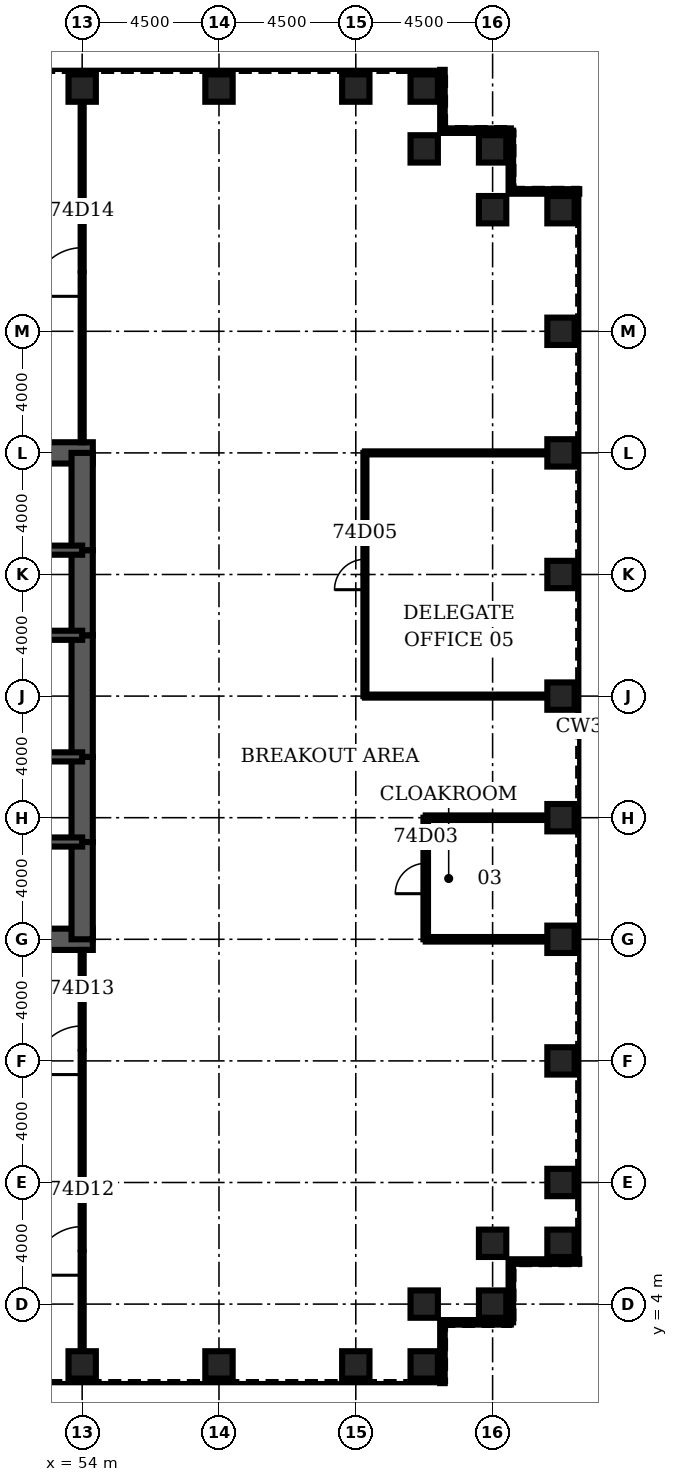
"""IFC4 building model, lengths in metres.
Left out: names, types, materials, properties, quantities, classifications, styles, units other than length and angle.
Written with IfcOpenShell. Run it as: python <this file> out.ifc"""

import sys

from ifc_helpers import new_model, si_unit, direction, frame, frame_2d, origin, origin_2d, place, context, subcontext, project, spatial, rectangle, hollow_rectangle, extrude, element, fill, save


model = new_model("IFC4")
c1 = context("Model", 3, precision=1e-05, world=origin(), true_north=direction((0.0, 1.0)))
c2 = subcontext(c1, "Body", "Model", "MODEL_VIEW")
j1 = project(units=[si_unit("LENGTHUNIT", "METRE"), si_unit("PLANEANGLEUNIT", "RADIAN")], contexts=[c1])
p1 = place(None, origin())
s1 = spatial("IfcSite", under=j1, at=p1, CompositionType="ELEMENT")
p2 = place(p1, origin())
s2 = spatial("IfcBuilding", under=s1, at=p2, CompositionType="ELEMENT")
p3 = place(p2, frame((0.0, 0.0, 325.7)))
s3 = spatial("IfcBuildingStorey", under=s2, at=p3, CompositionType="ELEMENT", Elevation=325.7)
for number, where, z_axis, x_axis in (
    (1, (54.0, 2.0, 0.0), (0.0, 0.0, 1.0), (0.0, 1.0, 0.0)),
    (2, (58.5, 2.0, 0.0), (0.0, 0.0, 1.0), (0.0, 1.0, 0.0)),
    (3, (63.0, 2.0, 0.0), (0.0, 0.0, 1.0), (0.0, 1.0, 0.0)),
    (4, (65.25, 2.0, 0.0), (0.0, 0.0, 1.0), (0.0, 1.0, 0.0)),
    (5, (65.25, 4.0, 0.0), (0.0, 0.0, 1.0), (0.0, 1.0, 0.0)),
    (6, (67.5, 4.0, 0.0), (0.0, 0.0, 1.0), (1.0, 0.0, 0.0)),
    (7, (67.5, 6.0, 0.0), (0.0, 0.0, 1.0), (1.0, 0.0, 0.0)),
    (8, (69.75, 6.0, 0.0), (0.0, 0.0, 1.0), (1.0, 0.0, 0.0)),
    (9, (69.75, 8.0, 0.0), (0.0, 0.0, 1.0), (1.0, 0.0, 0.0)),
    (10, (69.75, 12.0, 0.0), (0.0, 0.0, 1.0), (1.0, 0.0, 0.0)),
    (11, (69.75, 16.0, 0.0), (0.0, 0.0, 1.0), (1.0, 0.0, 0.0)),
    (12, (69.75, 20.0, 0.0), (0.0, 0.0, 1.0), (1.0, 0.0, 0.0)),
    (13, (69.75, 24.0, 0.0), (0.0, 0.0, 1.0), (1.0, 0.0, 0.0)),
    (14, (69.75, 28.0, 0.0), (0.0, 0.0, 1.0), (1.0, 0.0, 0.0)),
    (15, (69.75, 32.0, 0.0), (0.0, 0.0, 1.0), (1.0, 0.0, 0.0)),
    (16, (69.75, 36.0, 0.0), (0.0, 0.0, 1.0), (1.0, 0.0, 0.0)),
    (17, (69.75, 40.0, 0.0), (0.0, 0.0, 1.0), (1.0, 0.0, 0.0)),
    (18, (67.5, 40.0, 0.0), (0.0, 0.0, 1.0), (1.0, 0.0, 0.0)),
    (19, (67.5, 42.0, 0.0), (0.0, 0.0, 1.0), (1.0, 0.0, 0.0)),
    (20, (65.25, 42.0, 0.0), (0.0, 0.0, 1.0), (0.0, 1.0, 0.0)),
    (21, (65.25, 44.0, 0.0), (0.0, 0.0, 1.0), (0.0, 1.0, 0.0)),
    (22, (63.0, 44.0, 0.0), (0.0, 0.0, 1.0), (0.0, 1.0, 0.0)),
    (23, (58.5, 44.0, 0.0), (0.0, 0.0, 1.0), (0.0, 1.0, 0.0)),
    (24, (54.0, 44.0, 0.0), (0.0, 0.0, 1.0), (0.0, 1.0, 0.0)),
):
    element("IfcColumn", number, at=place(p3, frame(where, z_axis=z_axis, x_axis=x_axis)), inside=s3, PredefinedType="COLUMN", context=c2, shape_type="SweptSolid", body=[
        extrude(hollow_rectangle(XDim=0.9, YDim=0.9, WallThickness=0.05, at=origin_2d()), origin(), (0.0, 0.0, 1.0), 4.2),
    ])
for number, where, z_axis, x_axis in (
    (25, (45.0, 16.0, 0.0), (0.0, 0.0, 1.0), (1.0, 0.0, 0.0)),
    (26, (54.35, 32.0, 0.0), (0.0, 0.0, 1.0), (-1.0, 0.0, 0.0)),
):
    element("IfcWall", number, at=place(p3, frame(where, z_axis=z_axis, x_axis=x_axis)), inside=s3, PredefinedType="SHEAR", context=c2, shape_type="SweptSolid", body=[
        extrude(rectangle(XDim=9.35, YDim=0.7, at=frame_2d((4.675, 0.0))), origin(), (0.0, 0.0, 1.0), 4.2),
    ])
p4 = place(p3, frame((54.0, 16.0, 0.0), z_axis=(0.0, 0.0, 1.0), x_axis=(0.0, 1.0, 0.0)))
e27 = element("IfcWall", 27, at=p4, inside=s3, PredefinedType="SHEAR", context=c2, shape_type="SweptSolid", body=[
    extrude(rectangle(XDim=3.2, YDim=0.7, at=frame_2d((1.6, 0.0))), origin(), (0.0, 0.0, 1.0), 4.2),
])
p5 = place(p3, frame((54.0, 19.2, 0.0), z_axis=(0.0, 0.0, 1.0), x_axis=(0.0, 1.0, 0.0)))
e28 = element("IfcWall", 28, at=p5, inside=s3, PredefinedType="SHEAR", context=c2, shape_type="SweptSolid", body=[
    extrude(rectangle(XDim=2.8, YDim=0.7, at=frame_2d((1.4, 0.0))), origin(), (0.0, 0.0, 1.0), 4.2),
])
p6 = place(p5, frame((0.4, 0.0, 0.0)))
e29 = element("IfcOpeningElement", 29, at=p6, cuts=e28, PredefinedType="OPENING", context=c2, shape_type="SweptSolid", body=[
    extrude(rectangle(XDim=1.8, YDim=2.1, at=frame_2d((0.9, 1.05))), frame((0.0, 0.36, 0.0), z_axis=(0.0, -1.0, 0.0), x_axis=(1.0, 0.0, 0.0)), (0.0, 0.0, 1.0), 0.72),
])
p7 = place(p3, frame((54.0, 22.0, 0.0), z_axis=(0.0, 0.0, 1.0), x_axis=(0.0, 1.0, 0.0)))
e30 = element("IfcWall", 30, at=p7, inside=s3, PredefinedType="SHEAR", context=c2, shape_type="SweptSolid", body=[
    extrude(rectangle(XDim=4.0, YDim=0.7, at=frame_2d((2.0, 0.0))), origin(), (0.0, 0.0, 1.0), 4.2),
])
p8 = place(p3, frame((54.0, 26.0, 0.0), z_axis=(0.0, 0.0, 1.0), x_axis=(0.0, 1.0, 0.0)))
e31 = element("IfcWall", 31, at=p8, inside=s3, PredefinedType="SHEAR", context=c2, shape_type="SweptSolid", body=[
    extrude(rectangle(XDim=2.8, YDim=0.7, at=frame_2d((1.4, 0.0))), origin(), (0.0, 0.0, 1.0), 4.2),
])
p9 = place(p8, frame((0.6, 0.0, 0.0)))
e32 = element("IfcOpeningElement", 32, at=p9, cuts=e31, PredefinedType="OPENING", context=c2, shape_type="SweptSolid", body=[
    extrude(rectangle(XDim=1.8, YDim=2.1, at=frame_2d((0.9, 1.05))), frame((0.0, 0.36, 0.0), z_axis=(0.0, -1.0, 0.0), x_axis=(1.0, 0.0, 0.0)), (0.0, 0.0, 1.0), 0.72),
])
p10 = place(p3, frame((54.0, 28.8, 0.0), z_axis=(0.0, 0.0, 1.0), x_axis=(0.0, 1.0, 0.0)))
e33 = element("IfcWall", 33, at=p10, inside=s3, PredefinedType="SHEAR", context=c2, shape_type="SweptSolid", body=[
    extrude(rectangle(XDim=3.2, YDim=0.7, at=frame_2d((1.6, 0.0))), origin(), (0.0, 0.0, 1.0), 4.2),
])
p11 = place(p3, frame((45.0, 19.2, 0.0), z_axis=(0.0, 0.0, 1.0), x_axis=(1.0, 0.0, 0.0)))
e34 = element("IfcWall", 34, at=p11, inside=s3, PredefinedType="SOLIDWALL", context=c2, shape_type="SweptSolid", body=[
    extrude(rectangle(XDim=9.0, YDim=0.3, at=frame_2d((4.5, 0.0))), origin(), (0.0, 0.0, 1.0), 4.2),
])
p12 = place(p11, frame((7.35, 0.0, 0.0)))
e35 = element("IfcOpeningElement", 35, at=p12, cuts=e34, PredefinedType="OPENING", context=c2, shape_type="SweptSolid", body=[
    extrude(rectangle(XDim=1.0, YDim=2.1, at=frame_2d((0.5, 1.05))), frame((0.0, 0.16, 0.0), z_axis=(0.0, -1.0, 0.0), x_axis=(1.0, 0.0, 0.0)), (0.0, 0.0, 1.0), 0.32),
])
p13 = place(p3, frame((45.0, 28.8, 0.0), z_axis=(0.0, 0.0, 1.0), x_axis=(1.0, 0.0, 0.0)))
e36 = element("IfcWall", 36, at=p13, inside=s3, PredefinedType="SOLIDWALL", context=c2, shape_type="SweptSolid", body=[
    extrude(rectangle(XDim=9.0, YDim=0.3, at=frame_2d((4.5, 0.0))), origin(), (0.0, 0.0, 1.0), 4.2),
])
p14 = place(p13, frame((7.35, 0.0, 0.0)))
e37 = element("IfcOpeningElement", 37, at=p14, cuts=e36, PredefinedType="OPENING", context=c2, shape_type="SweptSolid", body=[
    extrude(rectangle(XDim=1.0, YDim=2.1, at=frame_2d((0.5, 1.05))), frame((0.0, 0.16, 0.0), z_axis=(0.0, -1.0, 0.0), x_axis=(1.0, 0.0, 0.0)), (0.0, 0.0, 1.0), 0.32),
])
p15 = place(p3, frame((48.0, 22.0, 0.0), z_axis=(0.0, 0.0, 1.0), x_axis=(1.0, 0.0, 0.0)))
e38 = element("IfcWall", 38, at=p15, inside=s3, PredefinedType="SOLIDWALL", context=c2, shape_type="SweptSolid", body=[
    extrude(rectangle(XDim=6.0, YDim=0.3, at=frame_2d((3.0, 0.0))), origin(), (0.0, 0.0, 1.0), 4.2),
])
p16 = place(p15, frame((2.0, 0.0, 0.0)))
e39 = element("IfcOpeningElement", 39, at=p16, cuts=e38, PredefinedType="OPENING", context=c2, shape_type="SweptSolid", body=[
    extrude(rectangle(XDim=1.0, YDim=2.1, at=frame_2d((0.5, 1.05))), frame((0.0, 0.16, 0.0), z_axis=(0.0, -1.0, 0.0), x_axis=(1.0, 0.0, 0.0)), (0.0, 0.0, 1.0), 0.32),
])
p17 = place(p15, frame((4.4, 0.0, 0.0)))
e40 = element("IfcOpeningElement", 40, at=p17, cuts=e38, PredefinedType="OPENING", context=c2, shape_type="SweptSolid", body=[
    extrude(rectangle(XDim=1.0, YDim=2.1, at=frame_2d((0.5, 1.05))), frame((0.0, 0.16, 0.0), z_axis=(0.0, -1.0, 0.0), x_axis=(1.0, 0.0, 0.0)), (0.0, 0.0, 1.0), 0.32),
])
p18 = place(p3, frame((48.0, 26.0, 0.0), z_axis=(0.0, 0.0, 1.0), x_axis=(1.0, 0.0, 0.0)))
e41 = element("IfcWall", 41, at=p18, inside=s3, PredefinedType="SOLIDWALL", context=c2, shape_type="SweptSolid", body=[
    extrude(rectangle(XDim=6.0, YDim=0.3, at=frame_2d((3.0, 0.0))), origin(), (0.0, 0.0, 1.0), 4.2),
])
for number, where, z_axis, x_axis in (
    (42, (65.3, 16.0, 0.0), (0.0, 0.0, 1.0), (1.0, 0.0, 0.0)),
    (43, (65.3, 20.0, 0.0), (0.0, 0.0, 1.0), (1.0, 0.0, 0.0)),
):
    element("IfcWall", number, at=place(p3, frame(where, z_axis=z_axis, x_axis=x_axis)), inside=s3, PredefinedType="PARTITIONING", context=c2, shape_type="SweptSolid", body=[
        extrude(rectangle(XDim=4.0, YDim=0.15, at=frame_2d((2.0, 0.0))), origin(), (0.0, 0.0, 1.0), 3.0),
    ])
for number, where, z_axis, x_axis in (
    (44, (63.3, 24.0, 0.0), (0.0, 0.0, 1.0), (1.0, 0.0, 0.0)),
    (45, (63.3, 32.0, 0.0), (0.0, 0.0, 1.0), (1.0, 0.0, 0.0)),
):
    element("IfcWall", number, at=place(p3, frame(where, z_axis=z_axis, x_axis=x_axis)), inside=s3, PredefinedType="PARTITIONING", context=c2, shape_type="SweptSolid", body=[
        extrude(rectangle(XDim=6.0, YDim=0.1, at=frame_2d((3.0, 0.0))), origin(), (0.0, 0.0, 1.0), 3.0),
    ])
p19 = place(p3, frame((54.0, 2.45, 0.0), z_axis=(0.0, 0.0, 1.0), x_axis=(0.0, 1.0, 0.0)))
e46 = element("IfcWall", 46, at=p19, inside=s3, PredefinedType="PARTITIONING", context=c2, shape_type="SweptSolid", body=[
    extrude(rectangle(XDim=13.2, YDim=0.1, at=frame_2d((6.6, 0.0))), origin(), (0.0, 0.0, 1.0), 3.0),
])
p20 = place(p19, frame((2.5, 0.0, 0.0)))
e47 = element("IfcOpeningElement", 47, at=p20, cuts=e46, PredefinedType="OPENING", context=c2, shape_type="SweptSolid", body=[
    extrude(rectangle(XDim=1.6, YDim=2.1, at=frame_2d((0.8, 1.05))), frame((0.0, 0.06, 0.0), z_axis=(0.0, -1.0, 0.0), x_axis=(1.0, 0.0, 0.0)), (0.0, 0.0, 1.0), 0.12),
])
p21 = place(p19, frame((9.1, 0.0, 0.0)))
e48 = element("IfcOpeningElement", 48, at=p21, cuts=e46, PredefinedType="OPENING", context=c2, shape_type="SweptSolid", body=[
    extrude(rectangle(XDim=1.6, YDim=2.1, at=frame_2d((0.8, 1.05))), frame((0.0, 0.06, 0.0), z_axis=(0.0, -1.0, 0.0), x_axis=(1.0, 0.0, 0.0)), (0.0, 0.0, 1.0), 0.12),
])
p22 = place(p3, frame((54.0, 32.35, 0.0), z_axis=(0.0, 0.0, 1.0), x_axis=(0.0, 1.0, 0.0)))
e49 = element("IfcWall", 49, at=p22, inside=s3, PredefinedType="PARTITIONING", context=c2, shape_type="SweptSolid", body=[
    extrude(rectangle(XDim=11.2, YDim=0.1, at=frame_2d((5.6, 0.0))), origin(), (0.0, 0.0, 1.0), 3.0),
])
p23 = place(p22, frame((4.8, 0.0, 0.0)))
e50 = element("IfcOpeningElement", 50, at=p23, cuts=e49, PredefinedType="OPENING", context=c2, shape_type="SweptSolid", body=[
    extrude(rectangle(XDim=1.6, YDim=2.1, at=frame_2d((0.8, 1.05))), frame((0.0, 0.06, 0.0), z_axis=(0.0, -1.0, 0.0), x_axis=(1.0, 0.0, 0.0)), (0.0, 0.0, 1.0), 0.12),
])
p24 = place(p3, frame((63.3, 24.0, 0.0), z_axis=(0.0, 0.0, 1.0), x_axis=(0.0, 1.0, 0.0)))
e51 = element("IfcWall", 51, at=p24, inside=s3, PredefinedType="PARTITIONING", context=c2, shape_type="SweptSolid", body=[
    extrude(rectangle(XDim=8.0, YDim=0.1, at=frame_2d((4.0, 0.0))), origin(), (0.0, 0.0, 1.0), 3.0),
])
p25 = place(p24, frame((3.5, 0.0, 0.0)))
e52 = element("IfcOpeningElement", 52, at=p25, cuts=e51, PredefinedType="OPENING", context=c2, shape_type="SweptSolid", body=[
    extrude(rectangle(XDim=1.0, YDim=2.1, at=frame_2d((0.5, 1.05))), frame((0.0, 0.06, 0.0), z_axis=(0.0, -1.0, 0.0), x_axis=(1.0, 0.0, 0.0)), (0.0, 0.0, 1.0), 0.12),
])
p26 = place(p3, frame((65.3, 16.0, 0.0), z_axis=(0.0, 0.0, 1.0), x_axis=(0.0, 1.0, 0.0)))
e53 = element("IfcWall", 53, at=p26, inside=s3, PredefinedType="PARTITIONING", context=c2, shape_type="SweptSolid", body=[
    extrude(rectangle(XDim=4.0, YDim=0.15, at=frame_2d((2.0, 0.0))), origin(), (0.0, 0.0, 1.0), 3.0),
])
p27 = place(p26, frame((1.5, 0.0, 0.0)))
e54 = element("IfcOpeningElement", 54, at=p27, cuts=e53, PredefinedType="OPENING", context=c2, shape_type="SweptSolid", body=[
    extrude(rectangle(XDim=1.0, YDim=2.1, at=frame_2d((0.5, 1.05))), frame((0.0, 0.085, 0.0), z_axis=(0.0, -1.0, 0.0), x_axis=(1.0, 0.0, 0.0)), (0.0, 0.0, 1.0), 0.17),
])
p28 = place(p3, frame((65.85, 1.4, 0.0), z_axis=(0.0, 0.0, 1.0), x_axis=(0.0, 1.0, 0.0)))
e55 = element("IfcWall", 55, at=p28, inside=s3, PredefinedType="ELEMENTEDWALL", context=c2, shape_type="SweptSolid", body=[
    extrude(rectangle(XDim=2.0, YDim=0.15, at=frame_2d((1.0, 0.0))), origin(), (0.0, 0.0, 1.0), 4.04),
])
p29 = place(p3, frame((65.85, 3.4, 0.0), z_axis=(0.0, 0.0, 1.0), x_axis=(1.0, 0.0, 0.0)))
e56 = element("IfcWall", 56, at=p29, inside=s3, PredefinedType="ELEMENTEDWALL", context=c2, shape_type="SweptSolid", body=[
    extrude(rectangle(XDim=2.25, YDim=0.15, at=frame_2d((1.125, 0.0))), origin(), (0.0, 0.0, 1.0), 4.04),
])
p30 = place(p3, frame((68.1, 3.4, 0.0), z_axis=(0.0, 0.0, 1.0), x_axis=(0.0, 1.0, 0.0)))
e57 = element("IfcWall", 57, at=p30, inside=s3, PredefinedType="ELEMENTEDWALL", context=c2, shape_type="SweptSolid", body=[
    extrude(rectangle(XDim=2.0, YDim=0.15, at=frame_2d((1.0, 0.0))), origin(), (0.0, 0.0, 1.0), 4.04),
])
for number, where, z_axis, x_axis in (
    (58, (68.1, 5.4, 0.0), (0.0, 0.0, 1.0), (1.0, 0.0, 0.0)),
    (59, (70.35, 40.6, 0.0), (0.0, 0.0, 1.0), (-1.0, 0.0, 0.0)),
):
    element("IfcWall", number, at=place(p3, frame(where, z_axis=z_axis, x_axis=x_axis)), inside=s3, PredefinedType="ELEMENTEDWALL", context=c2, shape_type="SweptSolid", body=[
        extrude(rectangle(XDim=2.25, YDim=0.15, at=frame_2d((1.125, 0.0))), origin(), (0.0, 0.0, 1.0), 4.04),
    ])
p31 = place(p3, frame((68.1, 40.6, 0.0), z_axis=(0.0, 0.0, 1.0), x_axis=(0.0, 1.0, 0.0)))
e60 = element("IfcWall", 60, at=p31, inside=s3, PredefinedType="ELEMENTEDWALL", context=c2, shape_type="SweptSolid", body=[
    extrude(rectangle(XDim=2.0, YDim=0.15, at=frame_2d((1.0, 0.0))), origin(), (0.0, 0.0, 1.0), 4.04),
])
p32 = place(p3, frame((68.1, 42.6, 0.0), z_axis=(0.0, 0.0, 1.0), x_axis=(-1.0, 0.0, 0.0)))
e61 = element("IfcWall", 61, at=p32, inside=s3, PredefinedType="ELEMENTEDWALL", context=c2, shape_type="SweptSolid", body=[
    extrude(rectangle(XDim=2.25, YDim=0.15, at=frame_2d((1.125, 0.0))), origin(), (0.0, 0.0, 1.0), 4.04),
])
p33 = place(p3, frame((65.85, 42.6, 0.0), z_axis=(0.0, 0.0, 1.0), x_axis=(0.0, 1.0, 0.0)))
e62 = element("IfcWall", 62, at=p33, inside=s3, PredefinedType="ELEMENTEDWALL", context=c2, shape_type="SweptSolid", body=[
    extrude(rectangle(XDim=2.0, YDim=0.15, at=frame_2d((1.0, 0.0))), origin(), (0.0, 0.0, 1.0), 4.04),
])
p34 = place(p27, origin())
e63 = element("IfcDoor", 63, at=p34, inside=s3, OperationType="SINGLE_SWING_LEFT", PredefinedType="DOOR", context=c2, shape_type="SweptSolid", body=[
    extrude(rectangle(XDim=1.0, YDim=2.1, at=frame_2d((0.5, 1.05))), frame((0.0, 0.025, 0.0), z_axis=(0.0, -1.0, 0.0), x_axis=(1.0, 0.0, 0.0)), (0.0, 0.0, 1.0), 0.05),
])
fill(e54, e63)
p35 = place(p25, origin())
e64 = element("IfcDoor", 64, at=p35, inside=s3, OperationType="SINGLE_SWING_LEFT", PredefinedType="DOOR", context=c2, shape_type="SweptSolid", body=[
    extrude(rectangle(XDim=1.0, YDim=2.1, at=frame_2d((0.5, 1.05))), frame((0.0, 0.025, 0.0), z_axis=(0.0, -1.0, 0.0), x_axis=(1.0, 0.0, 0.0)), (0.0, 0.0, 1.0), 0.05),
])
fill(e52, e64)
p36 = place(p20, origin())
e65 = element("IfcDoor", 65, at=p36, inside=s3, OperationType="SINGLE_SWING_LEFT", PredefinedType="DOOR", context=c2, shape_type="SweptSolid", body=[
    extrude(rectangle(XDim=1.6, YDim=2.1, at=frame_2d((0.8, 1.05))), frame((0.0, 0.025, 0.0), z_axis=(0.0, -1.0, 0.0), x_axis=(1.0, 0.0, 0.0)), (0.0, 0.0, 1.0), 0.05),
])
fill(e47, e65)
p37 = place(p21, origin())
e66 = element("IfcDoor", 66, at=p37, inside=s3, OperationType="SINGLE_SWING_LEFT", PredefinedType="DOOR", context=c2, shape_type="SweptSolid", body=[
    extrude(rectangle(XDim=1.6, YDim=2.1, at=frame_2d((0.8, 1.05))), frame((0.0, 0.025, 0.0), z_axis=(0.0, -1.0, 0.0), x_axis=(1.0, 0.0, 0.0)), (0.0, 0.0, 1.0), 0.05),
])
fill(e48, e66)
p38 = place(p23, origin())
e67 = element("IfcDoor", 67, at=p38, inside=s3, OperationType="SINGLE_SWING_LEFT", PredefinedType="DOOR", context=c2, shape_type="SweptSolid", body=[
    extrude(rectangle(XDim=1.6, YDim=2.1, at=frame_2d((0.8, 1.05))), frame((0.0, 0.025, 0.0), z_axis=(0.0, -1.0, 0.0), x_axis=(1.0, 0.0, 0.0)), (0.0, 0.0, 1.0), 0.05),
])
fill(e50, e67)
p39 = place(p12, origin())
e68 = element("IfcDoor", 68, at=p39, inside=s3, OperationType="SINGLE_SWING_RIGHT", PredefinedType="DOOR", context=c2, shape_type="SweptSolid", body=[
    extrude(rectangle(XDim=1.0, YDim=2.1, at=frame_2d((0.5, 1.05))), frame((0.0, 0.025, 0.0), z_axis=(0.0, -1.0, 0.0), x_axis=(1.0, 0.0, 0.0)), (0.0, 0.0, 1.0), 0.05),
])
fill(e35, e68)
p40 = place(p14, origin())
e69 = element("IfcDoor", 69, at=p40, inside=s3, OperationType="SINGLE_SWING_RIGHT", PredefinedType="DOOR", context=c2, shape_type="SweptSolid", body=[
    extrude(rectangle(XDim=1.0, YDim=2.1, at=frame_2d((0.5, 1.05))), frame((0.0, 0.025, 0.0), z_axis=(0.0, -1.0, 0.0), x_axis=(1.0, 0.0, 0.0)), (0.0, 0.0, 1.0), 0.05),
])
fill(e37, e69)
p41 = place(p6, origin())
e70 = element("IfcDoor", 70, at=p41, inside=s3, OperationType="SINGLE_SWING_LEFT", PredefinedType="DOOR", context=c2, shape_type="SweptSolid", body=[
    extrude(rectangle(XDim=1.8, YDim=2.1, at=frame_2d((0.9, 1.05))), frame((0.0, 0.35, 0.0), z_axis=(0.0, -1.0, 0.0), x_axis=(1.0, 0.0, 0.0)), (0.0, 0.0, 1.0), 0.699),
])
fill(e29, e70)
p42 = place(p9, origin())
e71 = element("IfcDoor", 71, at=p42, inside=s3, OperationType="SINGLE_SWING_LEFT", PredefinedType="DOOR", context=c2, shape_type="SweptSolid", body=[
    extrude(rectangle(XDim=1.8, YDim=2.1, at=frame_2d((0.9, 1.05))), frame((0.0, 0.35, 0.0), z_axis=(0.0, -1.0, 0.0), x_axis=(1.0, 0.0, 0.0)), (0.0, 0.0, 1.0), 0.699),
])
fill(e32, e71)
p43 = place(p17, origin())
e72 = element("IfcDoor", 72, at=p43, inside=s3, OperationType="SINGLE_SWING_RIGHT", PredefinedType="DOOR", context=c2, shape_type="SweptSolid", body=[
    extrude(rectangle(XDim=1.0, YDim=2.1, at=frame_2d((0.5, 1.05))), frame((0.0, 0.025, 0.0), z_axis=(0.0, -1.0, 0.0), x_axis=(1.0, 0.0, 0.0)), (0.0, 0.0, 1.0), 0.05),
])
fill(e40, e72)
save(model, sys.argv[1])
